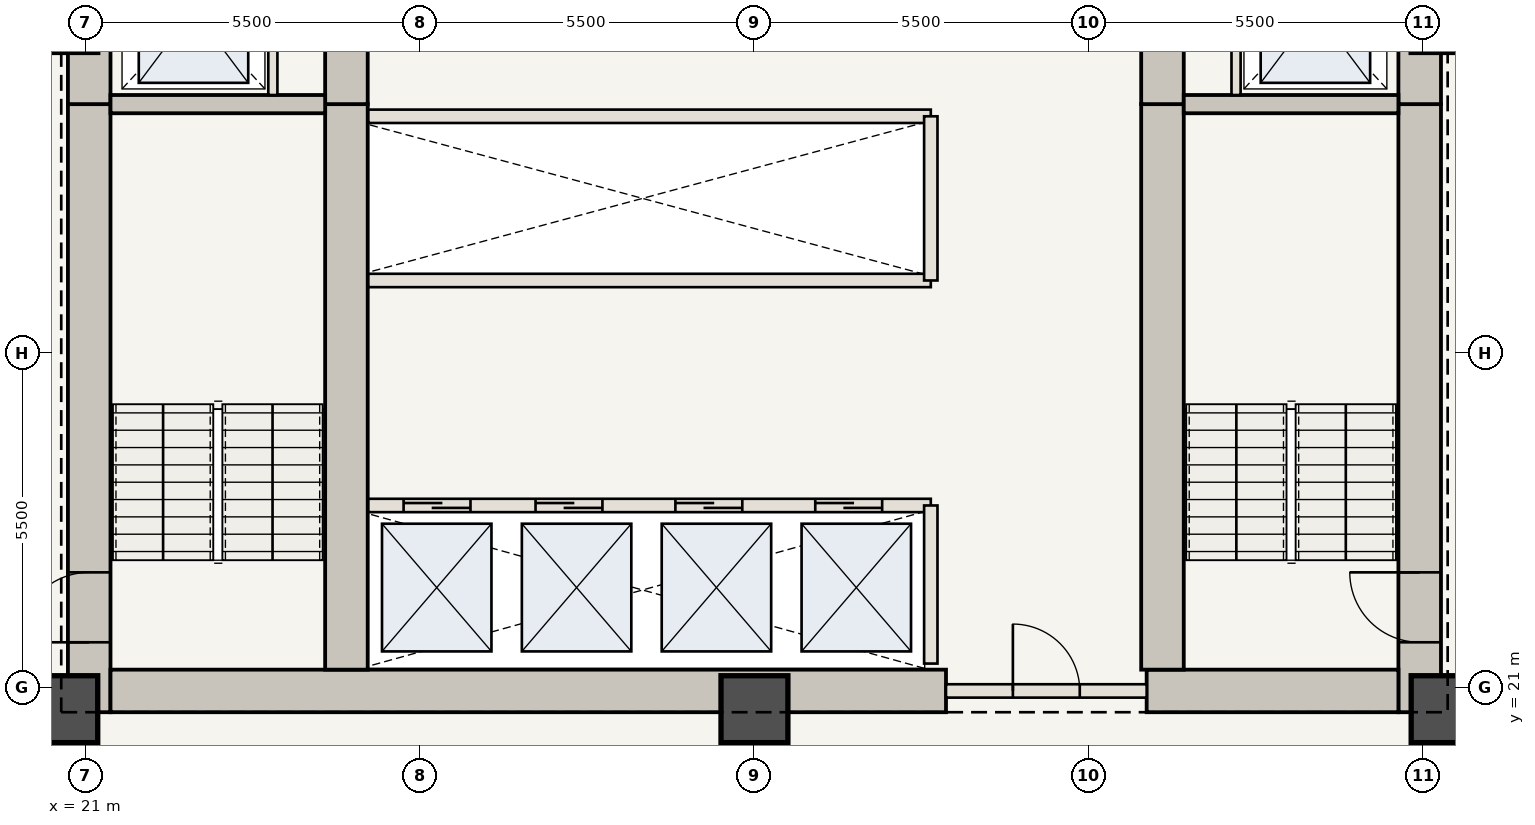
"""IFC4 building model, lengths in metres.
Left out: names, types, materials, properties, quantities, classifications, styles, units other than length and angle.
Written with IfcOpenShell. Run it as: python <this file> out.ifc"""

import sys

from ifc_helpers import new_model, si_unit, direction, frame, frame_2d, origin, origin_2d, place, context, subcontext, project, spatial, rectangle, extrude, element, fill, save


model = new_model("IFC4")
c1 = context("Model", 3, precision=1e-05, world=origin(), true_north=direction((0.0, 1.0)))
c2 = subcontext(c1, "Body", "Model", "MODEL_VIEW")
j1 = project(units=[si_unit("LENGTHUNIT", "METRE"), si_unit("PLANEANGLEUNIT", "RADIAN")], contexts=[c1])
p1 = place(None, origin())
s1 = spatial("IfcSite", under=j1, at=p1, CompositionType="ELEMENT")
p2 = place(p1, origin())
s2 = spatial("IfcBuilding", under=s1, at=p2, CompositionType="ELEMENT")
p3 = place(p2, frame((0.0, 0.0, 66.85)))
s3 = spatial("IfcBuildingStorey", under=s2, at=p3, CompositionType="ELEMENT", Elevation=66.85)
p4 = place(p3, frame((21.06, 20.6, 0.0), z_axis=(0.0, 0.0, 1.0), x_axis=(0.0, 1.0, 0.0)))
e1 = element("IfcWall", 1, at=p4, inside=s3, PredefinedType="SHEAR", context=c2, shape_type="SweptSolid", body=[
    extrude(rectangle(XDim=10.0, YDim=0.7, at=frame_2d((5.0, 0.0))), origin(), (0.0, 0.0, 1.0), 3.5),
])
p5 = place(p4, frame((1.15, 0.0, 0.0)))
e2 = element("IfcOpeningElement", 2, at=p5, cuts=e1, PredefinedType="OPENING", context=c2, shape_type="SweptSolid", body=[
    extrude(rectangle(XDim=1.15, YDim=2.15, at=frame_2d((0.575, 1.075))), frame((0.0, 0.36, 0.0), z_axis=(0.0, -1.0, 0.0), x_axis=(1.0, 0.0, 0.0)), (0.0, 0.0, 1.0), 0.72),
])
p6 = place(p3, frame((21.06, 30.6, 0.0), z_axis=(0.0, 0.0, 1.0), x_axis=(0.0, 1.0, 0.0)))
e3 = element("IfcWall", 3, at=p6, inside=s3, PredefinedType="SHEAR", context=c2, shape_type="SweptSolid", body=[
    extrude(rectangle(XDim=12.75, YDim=0.7, at=frame_2d((6.375, 0.0))), origin(), (0.0, 0.0, 1.0), 3.5),
])
p7 = place(p6, frame((4.2, 0.0, 0.0)))
e4 = element("IfcOpeningElement", 4, at=p7, cuts=e3, PredefinedType="OPENING", context=c2, shape_type="SweptSolid", body=[
    extrude(rectangle(XDim=1.1, YDim=2.15, at=frame_2d((0.55, 1.075))), frame((0.0, 0.36, 0.0), z_axis=(0.0, -1.0, 0.0), x_axis=(1.0, 0.0, 0.0)), (0.0, 0.0, 1.0), 0.72),
])
p8 = place(p6, frame((8.05, 0.0, 0.0)))
e5 = element("IfcOpeningElement", 5, at=p8, cuts=e3, PredefinedType="OPENING", context=c2, shape_type="SweptSolid", body=[
    extrude(rectangle(XDim=0.92, YDim=2.1, at=frame_2d((0.46, 1.05))), frame((0.0, 0.36, 0.0), z_axis=(0.0, -1.0, 0.0), x_axis=(1.0, 0.0, 0.0)), (0.0, 0.0, 1.0), 0.72),
])
p9 = place(p6, frame((9.45, 0.0, 0.0)))
e6 = element("IfcOpeningElement", 6, at=p9, cuts=e3, PredefinedType="OPENING", context=c2, shape_type="SweptSolid", body=[
    extrude(rectangle(XDim=0.88, YDim=2.1, at=frame_2d((0.44, 1.05))), frame((0.0, 0.36, 0.0), z_axis=(0.0, -1.0, 0.0), x_axis=(1.0, 0.0, 0.0)), (0.0, 0.0, 1.0), 0.72),
])
p10 = place(p6, frame((10.85, 0.0, 0.0)))
e7 = element("IfcOpeningElement", 7, at=p10, cuts=e3, PredefinedType="OPENING", context=c2, shape_type="SweptSolid", body=[
    extrude(rectangle(XDim=0.88, YDim=2.1, at=frame_2d((0.44, 1.05))), frame((0.0, 0.36, 0.0), z_axis=(0.0, -1.0, 0.0), x_axis=(1.0, 0.0, 0.0)), (0.0, 0.0, 1.0), 0.72),
])
p11 = place(p3, frame((42.94, 20.6, 0.0), z_axis=(0.0, 0.0, 1.0), x_axis=(0.0, 1.0, 0.0)))
e8 = element("IfcWall", 8, at=p11, inside=s3, PredefinedType="SHEAR", context=c2, shape_type="SweptSolid", body=[
    extrude(rectangle(XDim=10.0, YDim=0.7, at=frame_2d((5.0, 0.0))), origin(), (0.0, 0.0, 1.0), 3.5),
])
p12 = place(p11, frame((1.15, 0.0, 0.0)))
e9 = element("IfcOpeningElement", 9, at=p12, cuts=e8, PredefinedType="OPENING", context=c2, shape_type="SweptSolid", body=[
    extrude(rectangle(XDim=1.15, YDim=2.15, at=frame_2d((0.575, 1.075))), frame((0.0, 0.36, 0.0), z_axis=(0.0, -1.0, 0.0), x_axis=(1.0, 0.0, 0.0)), (0.0, 0.0, 1.0), 0.72),
])
p13 = place(p3, frame((42.94, 30.6, 0.0), z_axis=(0.0, 0.0, 1.0), x_axis=(0.0, 1.0, 0.0)))
e10 = element("IfcWall", 10, at=p13, inside=s3, PredefinedType="SHEAR", context=c2, shape_type="SweptSolid", body=[
    extrude(rectangle(XDim=12.75, YDim=0.7, at=frame_2d((6.375, 0.0))), origin(), (0.0, 0.0, 1.0), 3.5),
])
p14 = place(p13, frame((4.2, 0.0, 0.0)))
e11 = element("IfcOpeningElement", 11, at=p14, cuts=e10, PredefinedType="OPENING", context=c2, shape_type="SweptSolid", body=[
    extrude(rectangle(XDim=1.1, YDim=2.15, at=frame_2d((0.55, 1.075))), frame((0.0, 0.36, 0.0), z_axis=(0.0, -1.0, 0.0), x_axis=(1.0, 0.0, 0.0)), (0.0, 0.0, 1.0), 0.72),
])
p15 = place(p13, frame((9.2, 0.0, 0.0)))
e12 = element("IfcOpeningElement", 12, at=p15, cuts=e10, PredefinedType="OPENING", context=c2, shape_type="SweptSolid", body=[
    extrude(rectangle(XDim=0.92, YDim=2.1, at=frame_2d((0.46, 1.05))), frame((0.0, 0.36, 0.0), z_axis=(0.0, -1.0, 0.0), x_axis=(1.0, 0.0, 0.0)), (0.0, 0.0, 1.0), 0.72),
])
p16 = place(p3, frame((21.41, 20.95, 0.0), z_axis=(0.0, 0.0, 1.0), x_axis=(1.0, 0.0, 0.0)))
e13 = element("IfcWall", 13, at=p16, inside=s3, PredefinedType="SHEAR", context=c2, shape_type="SweptSolid", body=[
    extrude(rectangle(XDim=13.74, YDim=0.7, at=frame_2d((6.87, 0.0))), origin(), (0.0, 0.0, 1.0), 3.5),
])
p17 = place(p3, frame((38.45, 20.95, 0.0), z_axis=(0.0, 0.0, 1.0), x_axis=(1.0, 0.0, 0.0)))
e14 = element("IfcWall", 14, at=p17, inside=s3, PredefinedType="SHEAR", context=c2, shape_type="SweptSolid", body=[
    extrude(rectangle(XDim=4.14, YDim=0.7, at=frame_2d((2.07, 0.0))), origin(), (0.0, 0.0, 1.0), 3.5),
])
p18 = place(p3, frame((25.29, 21.3, 0.0), z_axis=(0.0, 0.0, 1.0), x_axis=(0.0, 1.0, 0.0)))
e15 = element("IfcWall", 15, at=p18, inside=s3, PredefinedType="SHEAR", context=c2, shape_type="SweptSolid", body=[
    extrude(rectangle(XDim=9.3, YDim=0.7, at=frame_2d((4.65, 0.0))), origin(), (0.0, 0.0, 1.0), 3.5),
])
p19 = place(p3, frame((25.29, 30.6, 0.0), z_axis=(0.0, 0.0, 1.0), x_axis=(0.0, 1.0, 0.0)))
e16 = element("IfcWall", 16, at=p19, inside=s3, PredefinedType="SHEAR", context=c2, shape_type="SweptSolid", body=[
    extrude(rectangle(XDim=12.05, YDim=0.7, at=frame_2d((6.025, 0.0))), origin(), (0.0, 0.0, 1.0), 3.5),
])
p20 = place(p19, frame((6.25, 0.0, 0.0)))
e17 = element("IfcOpeningElement", 17, at=p20, cuts=e16, PredefinedType="OPENING", context=c2, shape_type="SweptSolid", body=[
    extrude(rectangle(XDim=1.1, YDim=2.15, at=frame_2d((0.55, 1.075))), frame((0.0, 0.36, 0.0), z_axis=(0.0, -1.0, 0.0), x_axis=(1.0, 0.0, 0.0)), (0.0, 0.0, 1.0), 0.72),
])
p21 = place(p3, frame((38.71, 21.3, 0.0), z_axis=(0.0, 0.0, 1.0), x_axis=(0.0, 1.0, 0.0)))
e18 = element("IfcWall", 18, at=p21, inside=s3, PredefinedType="SHEAR", context=c2, shape_type="SweptSolid", body=[
    extrude(rectangle(XDim=9.3, YDim=0.7, at=frame_2d((4.65, 0.0))), origin(), (0.0, 0.0, 1.0), 3.5),
])
p22 = place(p3, frame((38.71, 30.6, 0.0), z_axis=(0.0, 0.0, 1.0), x_axis=(0.0, 1.0, 0.0)))
e19 = element("IfcWall", 19, at=p22, inside=s3, PredefinedType="SHEAR", context=c2, shape_type="SweptSolid", body=[
    extrude(rectangle(XDim=12.05, YDim=0.7, at=frame_2d((6.025, 0.0))), origin(), (0.0, 0.0, 1.0), 3.5),
])
for number, where, z_axis, x_axis in (
    (20, (20.65, 20.65, 0.0), (0.0, 0.0, 1.0), (1.0, 0.0, 0.0)),
    (21, (32.0, 20.65, 0.0), (0.0, 0.0, 1.0), (1.0, 0.0, 0.0)),
    (22, (43.35, 20.65, 0.0), (0.0, 0.0, 1.0), (1.0, 0.0, 0.0)),
):
    element("IfcColumn", number, at=place(p3, frame(where, z_axis=z_axis, x_axis=x_axis)), inside=s3, PredefinedType="COLUMN", context=c2, shape_type="SweptSolid", body=[
        extrude(rectangle(XDim=1.1, YDim=1.1, at=origin_2d()), origin(), (0.0, 0.0, 1.0), 3.5),
    ])
for number, where, z_axis, x_axis in (
    (23, (21.41, 30.6, 0.0), (0.0, 0.0, 1.0), (1.0, 0.0, 0.0)),
    (24, (39.06, 30.6, 0.0), (0.0, 0.0, 1.0), (1.0, 0.0, 0.0)),
):
    element("IfcWall", number, at=place(p3, frame(where, z_axis=z_axis, x_axis=x_axis)), inside=s3, PredefinedType="SHEAR", context=c2, shape_type="SweptSolid", body=[
        extrude(rectangle(XDim=3.53, YDim=0.3, at=frame_2d((1.765, 0.0))), origin(), (0.0, 0.0, 1.0), 3.32),
    ])
for number, where, z_axis, x_axis in (
    (25, (24.08, 30.75, 0.0), (0.0, 0.0, 1.0), (0.0, 1.0, 0.0)),
    (26, (39.92, 30.75, 0.0), (0.0, 0.0, 1.0), (0.0, 1.0, 0.0)),
):
    element("IfcWall", number, at=place(p3, frame(where, z_axis=z_axis, x_axis=x_axis)), inside=s3, PredefinedType="STANDARD", context=c2, shape_type="SweptSolid", body=[
        extrude(rectangle(XDim=2.65, YDim=0.15, at=frame_2d((1.325, 0.0))), origin(), (0.0, 0.0, 1.0), 3.32),
    ])
p23 = place(p3, frame((35.15, 20.95, 0.0), z_axis=(0.0, 0.0, 1.0), x_axis=(1.0, 0.0, 0.0)))
e27 = element("IfcWall", 27, at=p23, inside=s3, PredefinedType="STANDARD", context=c2, shape_type="SweptSolid", body=[
    extrude(rectangle(XDim=3.3, YDim=0.22, at=frame_2d((1.65, 0.0))), origin(), (0.0, 0.0, 1.0), 3.32),
])
p24 = place(p23, frame((1.1, 0.0, 0.0)))
e28 = element("IfcOpeningElement", 28, at=p24, cuts=e27, PredefinedType="OPENING", context=c2, shape_type="SweptSolid", body=[
    extrude(rectangle(XDim=1.1, YDim=2.15, at=frame_2d((0.55, 1.075))), frame((0.0, 0.12, 0.0), z_axis=(0.0, -1.0, 0.0), x_axis=(1.0, 0.0, 0.0)), (0.0, 0.0, 1.0), 0.24),
])
p25 = place(p3, frame((25.65, 24.0, 0.0), z_axis=(0.0, 0.0, 1.0), x_axis=(1.0, 0.0, 0.0)))
e29 = element("IfcWall", 29, at=p25, inside=s3, PredefinedType="STANDARD", context=c2, shape_type="SweptSolid", body=[
    extrude(rectangle(XDim=9.25, YDim=0.22, at=frame_2d((4.625, 0.0))), origin(), (0.0, 0.0, 1.0), 3.32),
])
p26 = place(p25, frame((0.58, 0.0, 0.0)))
e30 = element("IfcOpeningElement", 30, at=p26, cuts=e29, PredefinedType="OPENING", context=c2, shape_type="SweptSolid", body=[
    extrude(rectangle(XDim=1.1, YDim=2.15, at=frame_2d((0.55, 1.075))), frame((0.0, 0.12, 0.0), z_axis=(0.0, -1.0, 0.0), x_axis=(1.0, 0.0, 0.0)), (0.0, 0.0, 1.0), 0.24),
])
p27 = place(p25, frame((2.75, 0.0, 0.0)))
e31 = element("IfcOpeningElement", 31, at=p27, cuts=e29, PredefinedType="OPENING", context=c2, shape_type="SweptSolid", body=[
    extrude(rectangle(XDim=1.1, YDim=2.15, at=frame_2d((0.55, 1.075))), frame((0.0, 0.12, 0.0), z_axis=(0.0, -1.0, 0.0), x_axis=(1.0, 0.0, 0.0)), (0.0, 0.0, 1.0), 0.24),
])
p28 = place(p25, frame((5.05, 0.0, 0.0)))
e32 = element("IfcOpeningElement", 32, at=p28, cuts=e29, PredefinedType="OPENING", context=c2, shape_type="SweptSolid", body=[
    extrude(rectangle(XDim=1.1, YDim=2.15, at=frame_2d((0.55, 1.075))), frame((0.0, 0.12, 0.0), z_axis=(0.0, -1.0, 0.0), x_axis=(1.0, 0.0, 0.0)), (0.0, 0.0, 1.0), 0.24),
])
p29 = place(p25, frame((7.35, 0.0, 0.0)))
e33 = element("IfcOpeningElement", 33, at=p29, cuts=e29, PredefinedType="OPENING", context=c2, shape_type="SweptSolid", body=[
    extrude(rectangle(XDim=1.1, YDim=2.15, at=frame_2d((0.55, 1.075))), frame((0.0, 0.12, 0.0), z_axis=(0.0, -1.0, 0.0), x_axis=(1.0, 0.0, 0.0)), (0.0, 0.0, 1.0), 0.24),
])
p30 = place(p3, frame((34.9, 21.4, 0.0), z_axis=(0.0, 0.0, 1.0), x_axis=(0.0, 1.0, 0.0)))
e34 = element("IfcWall", 34, at=p30, inside=s3, PredefinedType="STANDARD", context=c2, shape_type="SweptSolid", body=[
    extrude(rectangle(XDim=2.6, YDim=0.22, at=frame_2d((1.3, 0.0))), origin(), (0.0, 0.0, 1.0), 3.32),
])
for number, where, z_axis, x_axis in (
    (35, (25.65, 27.7, 0.0), (0.0, 0.0, 1.0), (1.0, 0.0, 0.0)),
    (36, (25.65, 30.4, 0.0), (0.0, 0.0, 1.0), (1.0, 0.0, 0.0)),
):
    element("IfcWall", number, at=place(p3, frame(where, z_axis=z_axis, x_axis=x_axis)), inside=s3, PredefinedType="STANDARD", context=c2, shape_type="SweptSolid", body=[
        extrude(rectangle(XDim=9.25, YDim=0.22, at=frame_2d((4.625, 0.0))), origin(), (0.0, 0.0, 1.0), 3.32),
    ])
p31 = place(p3, frame((34.9, 27.7, 0.0), z_axis=(0.0, 0.0, 1.0), x_axis=(0.0, 1.0, 0.0)))
e37 = element("IfcWall", 37, at=p31, inside=s3, PredefinedType="STANDARD", context=c2, shape_type="SweptSolid", body=[
    extrude(rectangle(XDim=2.7, YDim=0.22, at=frame_2d((1.35, 0.0))), origin(), (0.0, 0.0, 1.0), 3.32),
])
p32 = place(p5, origin())
e38 = element("IfcDoor", 38, at=p32, inside=s3, OperationType="SINGLE_SWING_LEFT", PredefinedType="DOOR", context=c2, shape_type="SweptSolid", body=[
    extrude(rectangle(XDim=1.15, YDim=2.15, at=frame_2d((0.575, 1.075))), frame((0.0, 0.025, 0.0), z_axis=(0.0, -1.0, 0.0), x_axis=(1.0, 0.0, 0.0)), (0.0, 0.0, 1.0), 0.05),
])
fill(e2, e38)
p33 = place(p12, origin())
e39 = element("IfcDoor", 39, at=p33, inside=s3, OperationType="SINGLE_SWING_RIGHT", PredefinedType="DOOR", context=c2, shape_type="SweptSolid", body=[
    extrude(rectangle(XDim=1.15, YDim=2.15, at=frame_2d((0.575, 1.075))), frame((0.0, 0.025, 0.0), z_axis=(0.0, -1.0, 0.0), x_axis=(1.0, 0.0, 0.0)), (0.0, 0.0, 1.0), 0.05),
])
fill(e9, e39)
p34 = place(p24, origin())
e40 = element("IfcDoor", 40, at=p34, inside=s3, OperationType="SINGLE_SWING_LEFT", PredefinedType="DOOR", context=c2, shape_type="SweptSolid", body=[
    extrude(rectangle(XDim=1.1, YDim=2.15, at=frame_2d((0.55, 1.075))), frame((0.0, 0.025, 0.0), z_axis=(0.0, -1.0, 0.0), x_axis=(1.0, 0.0, 0.0)), (0.0, 0.0, 1.0), 0.05),
])
fill(e28, e40)
p35 = place(p26, origin())
e41 = element("IfcDoor", 41, at=p35, inside=s3, OperationType="DOUBLE_DOOR_SLIDING", PredefinedType="DOOR", context=c2, shape_type="SweptSolid", body=[
    extrude(rectangle(XDim=1.1, YDim=2.15, at=frame_2d((0.55, 1.075))), frame((0.0, 0.025, 0.0), z_axis=(0.0, -1.0, 0.0), x_axis=(1.0, 0.0, 0.0)), (0.0, 0.0, 1.0), 0.05),
])
fill(e30, e41)
p36 = place(p27, origin())
e42 = element("IfcDoor", 42, at=p36, inside=s3, OperationType="DOUBLE_DOOR_SLIDING", PredefinedType="DOOR", context=c2, shape_type="SweptSolid", body=[
    extrude(rectangle(XDim=1.1, YDim=2.15, at=frame_2d((0.55, 1.075))), frame((0.0, 0.025, 0.0), z_axis=(0.0, -1.0, 0.0), x_axis=(1.0, 0.0, 0.0)), (0.0, 0.0, 1.0), 0.05),
])
fill(e31, e42)
p37 = place(p28, origin())
e43 = element("IfcDoor", 43, at=p37, inside=s3, OperationType="DOUBLE_DOOR_SLIDING", PredefinedType="DOOR", context=c2, shape_type="SweptSolid", body=[
    extrude(rectangle(XDim=1.1, YDim=2.15, at=frame_2d((0.55, 1.075))), frame((0.0, 0.025, 0.0), z_axis=(0.0, -1.0, 0.0), x_axis=(1.0, 0.0, 0.0)), (0.0, 0.0, 1.0), 0.05),
])
fill(e32, e43)
p38 = place(p29, origin())
e44 = element("IfcDoor", 44, at=p38, inside=s3, OperationType="DOUBLE_DOOR_SLIDING", PredefinedType="DOOR", context=c2, shape_type="SweptSolid", body=[
    extrude(rectangle(XDim=1.1, YDim=2.15, at=frame_2d((0.55, 1.075))), frame((0.0, 0.025, 0.0), z_axis=(0.0, -1.0, 0.0), x_axis=(1.0, 0.0, 0.0)), (0.0, 0.0, 1.0), 0.05),
])
fill(e33, e44)
save(model, sys.argv[1])
